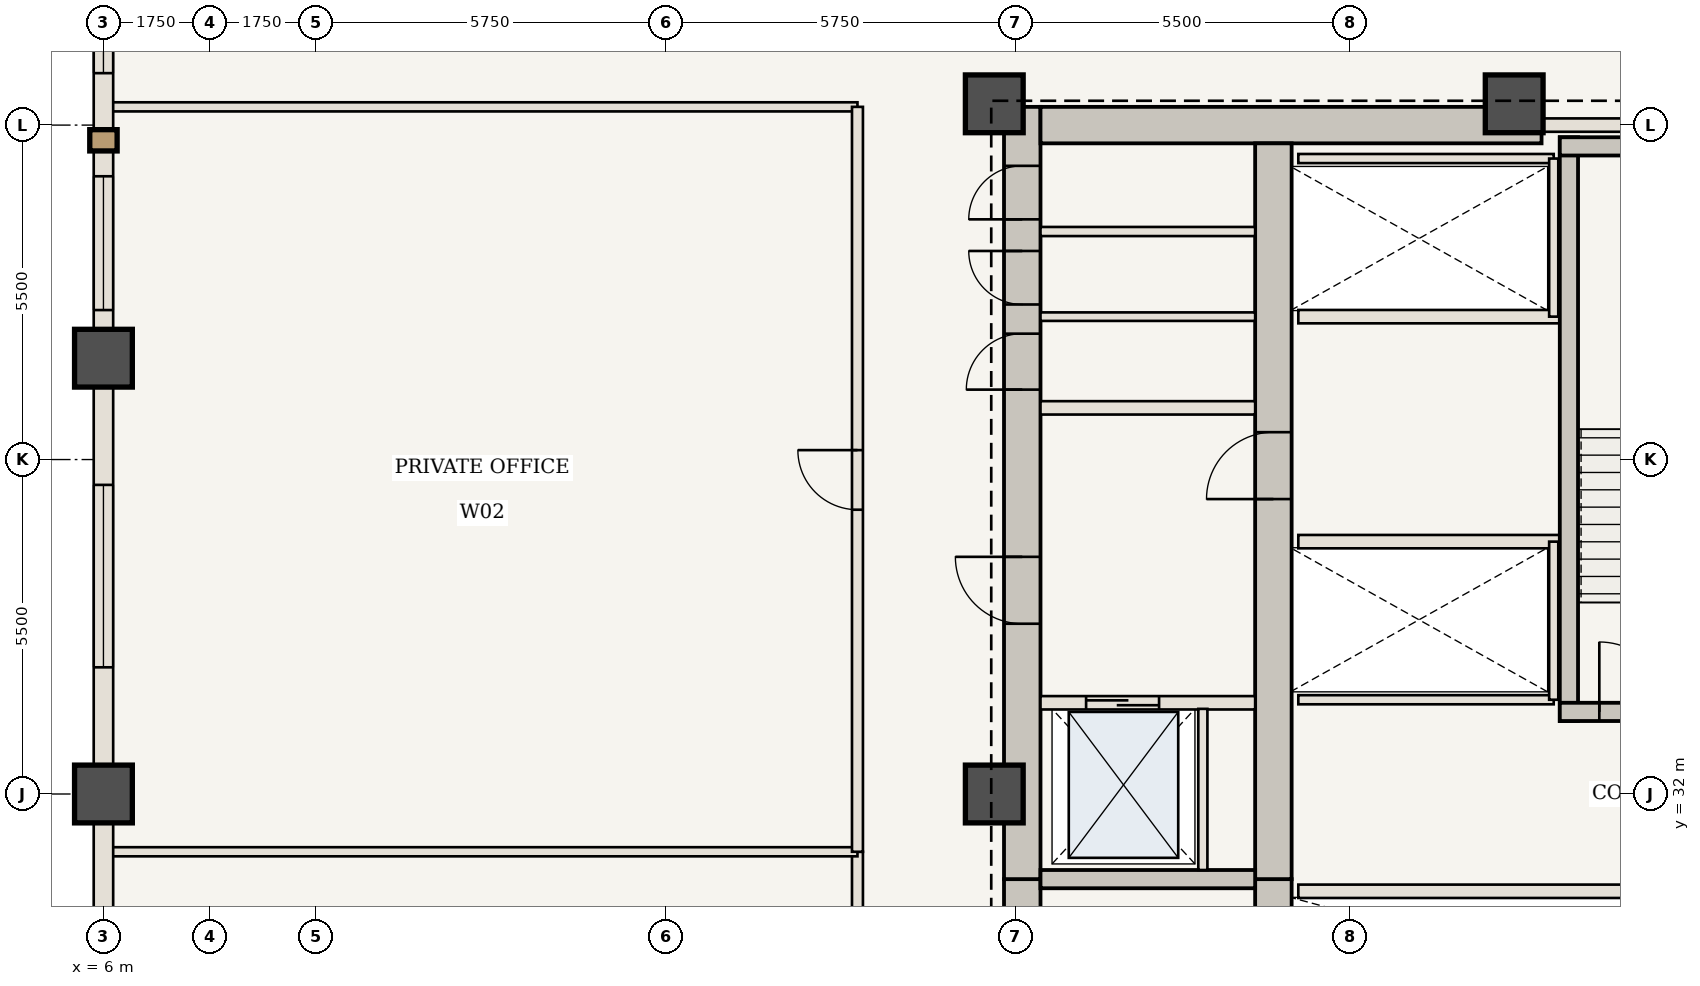
"""IFC4 building model, lengths in metres.
Left out: names, types, materials, properties, quantities, classifications, styles, units other than length and angle.
Written with IfcOpenShell. Run it as: python <this file> out.ifc"""

import sys

from ifc_helpers import new_model, si_unit, direction, frame, frame_2d, origin, origin_2d, place, context, subcontext, project, spatial, rectangle, extrude, element, fill, save


model = new_model("IFC4")
c1 = context("Model", 3, precision=1e-05, world=origin(), true_north=direction((0.0, 1.0)))
c2 = subcontext(c1, "Body", "Model", "MODEL_VIEW")
j1 = project(units=[si_unit("LENGTHUNIT", "METRE"), si_unit("PLANEANGLEUNIT", "RADIAN")], contexts=[c1])
p1 = place(None, origin())
s1 = spatial("IfcSite", under=j1, at=p1, CompositionType="ELEMENT")
p2 = place(p1, origin())
s2 = spatial("IfcBuilding", under=s1, at=p2, CompositionType="ELEMENT")
p3 = place(p2, frame((0.0, 0.0, 118.3)))
s3 = spatial("IfcBuildingStorey", under=s2, at=p3, CompositionType="ELEMENT", Elevation=118.3)
p4 = place(p3, frame((21.11, 20.65, 0.0), z_axis=(0.0, 0.0, 1.0), x_axis=(0.0, 1.0, 0.0)))
e1 = element("IfcWall", 1, at=p4, inside=s3, PredefinedType="SHEAR", context=c2, shape_type="SweptSolid", body=[
    extrude(rectangle(XDim=9.95, YDim=0.6, at=frame_2d((4.975, 0.0))), origin(), (0.0, 0.0, 1.0), 3.85),
])
p5 = place(p4, frame((1.1, 0.0, 0.0)))
e2 = element("IfcOpeningElement", 2, at=p5, cuts=e1, PredefinedType="OPENING", context=c2, shape_type="SweptSolid", body=[
    extrude(rectangle(XDim=1.15, YDim=2.15, at=frame_2d((0.575, 1.075))), frame((0.0, 0.31, 0.0), z_axis=(0.0, -1.0, 0.0), x_axis=(1.0, 0.0, 0.0)), (0.0, 0.0, 1.0), 0.62),
])
p6 = place(p3, frame((21.11, 30.6, 0.0), z_axis=(0.0, 0.0, 1.0), x_axis=(0.0, 1.0, 0.0)))
e3 = element("IfcWall", 3, at=p6, inside=s3, PredefinedType="SHEAR", context=c2, shape_type="SweptSolid", body=[
    extrude(rectangle(XDim=12.7, YDim=0.6, at=frame_2d((6.35, 0.0))), origin(), (0.0, 0.0, 1.0), 3.85),
])
p7 = place(p6, frame((4.2, 0.0, 0.0)))
e4 = element("IfcOpeningElement", 4, at=p7, cuts=e3, PredefinedType="OPENING", context=c2, shape_type="SweptSolid", body=[
    extrude(rectangle(XDim=1.1, YDim=2.15, at=frame_2d((0.55, 1.075))), frame((0.0, 0.31, 0.0), z_axis=(0.0, -1.0, 0.0), x_axis=(1.0, 0.0, 0.0)), (0.0, 0.0, 1.0), 0.62),
])
p8 = place(p6, frame((8.05, 0.0, 0.0)))
e5 = element("IfcOpeningElement", 5, at=p8, cuts=e3, PredefinedType="OPENING", context=c2, shape_type="SweptSolid", body=[
    extrude(rectangle(XDim=0.92, YDim=2.1, at=frame_2d((0.46, 1.05))), frame((0.0, 0.31, 0.0), z_axis=(0.0, -1.0, 0.0), x_axis=(1.0, 0.0, 0.0)), (0.0, 0.0, 1.0), 0.62),
])
p9 = place(p6, frame((9.45, 0.0, 0.0)))
e6 = element("IfcOpeningElement", 6, at=p9, cuts=e3, PredefinedType="OPENING", context=c2, shape_type="SweptSolid", body=[
    extrude(rectangle(XDim=0.88, YDim=2.1, at=frame_2d((0.44, 1.05))), frame((0.0, 0.31, 0.0), z_axis=(0.0, -1.0, 0.0), x_axis=(1.0, 0.0, 0.0)), (0.0, 0.0, 1.0), 0.62),
])
p10 = place(p6, frame((10.85, 0.0, 0.0)))
e7 = element("IfcOpeningElement", 7, at=p10, cuts=e3, PredefinedType="OPENING", context=c2, shape_type="SweptSolid", body=[
    extrude(rectangle(XDim=0.88, YDim=2.1, at=frame_2d((0.44, 1.05))), frame((0.0, 0.31, 0.0), z_axis=(0.0, -1.0, 0.0), x_axis=(1.0, 0.0, 0.0)), (0.0, 0.0, 1.0), 0.62),
])
p11 = place(p3, frame((21.41, 43.0, 0.0), z_axis=(0.0, 0.0, 1.0), x_axis=(1.0, 0.0, 0.0)))
e8 = element("IfcWall", 8, at=p11, inside=s3, PredefinedType="SHEAR", context=c2, shape_type="SweptSolid", body=[
    extrude(rectangle(XDim=8.24, YDim=0.6, at=frame_2d((4.12, 0.0))), origin(), (0.0, 0.0, 1.0), 3.85),
])
p12 = place(p3, frame((25.24, 21.25, 0.0), z_axis=(0.0, 0.0, 1.0), x_axis=(0.0, 1.0, 0.0)))
e9 = element("IfcWall", 9, at=p12, inside=s3, PredefinedType="SHEAR", context=c2, shape_type="SweptSolid", body=[
    extrude(rectangle(XDim=9.35, YDim=0.6, at=frame_2d((4.675, 0.0))), origin(), (0.0, 0.0, 1.0), 3.85),
])
p13 = place(p3, frame((25.24, 30.6, 0.0), z_axis=(0.0, 0.0, 1.0), x_axis=(0.0, 1.0, 0.0)))
e10 = element("IfcWall", 10, at=p13, inside=s3, PredefinedType="SHEAR", context=c2, shape_type="SweptSolid", body=[
    extrude(rectangle(XDim=12.1, YDim=0.6, at=frame_2d((6.05, 0.0))), origin(), (0.0, 0.0, 1.0), 3.85),
])
p14 = place(p13, frame((6.25, 0.0, 0.0)))
e11 = element("IfcOpeningElement", 11, at=p14, cuts=e10, PredefinedType="OPENING", context=c2, shape_type="SweptSolid", body=[
    extrude(rectangle(XDim=1.1, YDim=2.15, at=frame_2d((0.55, 1.075))), frame((0.0, 0.31, 0.0), z_axis=(0.0, -1.0, 0.0), x_axis=(1.0, 0.0, 0.0)), (0.0, 0.0, 1.0), 0.62),
])
for number, where, z_axis, x_axis in (
    (12, (29.2, 43.35, 0.0), (0.0, 0.0, 1.0), (1.0, 0.0, 0.0)),
    (13, (20.65, 43.35, 0.0), (0.0, 0.0, 1.0), (1.0, 0.0, 0.0)),
    (14, (20.65, 32.0, 0.0), (0.0, 0.0, 1.0), (1.0, 0.0, 0.0)),
    (15, (6.0, 32.0, 0.0), (0.0, 0.0, 1.0), (1.0, 0.0, 0.0)),
    (16, (6.0, 39.167, 0.0), (0.0, 0.0, 1.0), (1.0, 0.0, 0.0)),
):
    element("IfcColumn", number, at=place(p3, frame(where, z_axis=z_axis, x_axis=x_axis)), inside=s3, PredefinedType="COLUMN", context=c2, shape_type="SweptSolid", body=[
        extrude(rectangle(XDim=0.95, YDim=0.95, at=origin_2d()), origin(), (0.0, 0.0, 1.0), 3.85),
    ])
p15 = place(p3, frame((21.41, 30.6, 0.0), z_axis=(0.0, 0.0, 1.0), x_axis=(1.0, 0.0, 0.0)))
e17 = element("IfcWall", 17, at=p15, inside=s3, PredefinedType="SHEAR", context=c2, shape_type="SweptSolid", body=[
    extrude(rectangle(XDim=3.53, YDim=0.3, at=frame_2d((1.765, 0.0))), origin(), (0.0, 0.0, 1.0), 3.685),
])
p16 = place(p3, frame((21.41, 33.5, 0.0), z_axis=(0.0, 0.0, 1.0), x_axis=(1.0, 0.0, 0.0)))
e18 = element("IfcWall", 18, at=p16, inside=s3, PredefinedType="STANDARD", context=c2, shape_type="SweptSolid", body=[
    extrude(rectangle(XDim=3.53, YDim=0.22, at=frame_2d((1.765, 0.0))), origin(), (0.0, 0.0, 1.0), 3.685),
])
p17 = place(p16, frame((0.75, 0.0, 0.0)))
e19 = element("IfcOpeningElement", 19, at=p17, cuts=e18, PredefinedType="OPENING", context=c2, shape_type="SweptSolid", body=[
    extrude(rectangle(XDim=1.2, YDim=2.2, at=frame_2d((0.6, 1.1))), frame((0.0, 0.12, 0.0), z_axis=(0.0, -1.0, 0.0), x_axis=(1.0, 0.0, 0.0)), (0.0, 0.0, 1.0), 0.24),
])
p18 = place(p3, frame((24.08, 30.75, 0.0), z_axis=(0.0, 0.0, 1.0), x_axis=(0.0, 1.0, 0.0)))
e20 = element("IfcWall", 20, at=p18, inside=s3, PredefinedType="STANDARD", context=c2, shape_type="SweptSolid", body=[
    extrude(rectangle(XDim=2.65, YDim=0.15, at=frame_2d((1.325, 0.0))), origin(), (0.0, 0.0, 1.0), 3.685),
])
p19 = place(p3, frame((21.41, 38.35, 0.0), z_axis=(0.0, 0.0, 1.0), x_axis=(1.0, 0.0, 0.0)))
e21 = element("IfcWall", 21, at=p19, inside=s3, PredefinedType="STANDARD", context=c2, shape_type="SweptSolid", body=[
    extrude(rectangle(XDim=3.53, YDim=0.22, at=frame_2d((1.765, 0.0))), origin(), (0.0, 0.0, 1.0), 3.685),
])
p20 = place(p3, frame((21.41, 39.85, 0.0), z_axis=(0.0, 0.0, 1.0), x_axis=(1.0, 0.0, 0.0)))
e22 = element("IfcWall", 22, at=p20, inside=s3, PredefinedType="STANDARD", context=c2, shape_type="SweptSolid", body=[
    extrude(rectangle(XDim=3.53, YDim=0.14, at=frame_2d((1.765, 0.0))), origin(), (0.0, 0.0, 1.0), 3.685),
])
p21 = place(p3, frame((21.41, 41.25, 0.0), z_axis=(0.0, 0.0, 1.0), x_axis=(1.0, 0.0, 0.0)))
e23 = element("IfcWall", 23, at=p21, inside=s3, PredefinedType="STANDARD", context=c2, shape_type="SweptSolid", body=[
    extrude(rectangle(XDim=3.53, YDim=0.15, at=frame_2d((1.765, 0.0))), origin(), (0.0, 0.0, 1.0), 3.685),
])
p22 = place(p3, frame((25.65, 30.4, 0.0), z_axis=(0.0, 0.0, 1.0), x_axis=(1.0, 0.0, 0.0)))
e24 = element("IfcWall", 24, at=p22, inside=s3, PredefinedType="STANDARD", context=c2, shape_type="SweptSolid", body=[
    extrude(rectangle(XDim=9.25, YDim=0.22, at=frame_2d((4.625, 0.0))), origin(), (0.0, 0.0, 1.0), 3.685),
])
p23 = place(p3, frame((25.65, 36.15, 0.0), z_axis=(0.0, 0.0, 1.0), x_axis=(1.0, 0.0, 0.0)))
e25 = element("IfcWall", 25, at=p23, inside=s3, PredefinedType="STANDARD", context=c2, shape_type="SweptSolid", body=[
    extrude(rectangle(XDim=4.3, YDim=0.22, at=frame_2d((2.15, 0.0))), origin(), (0.0, 0.0, 1.0), 3.685),
])
p24 = place(p3, frame((25.65, 33.55, 0.0), z_axis=(0.0, 0.0, 1.0), x_axis=(1.0, 0.0, 0.0)))
e26 = element("IfcWall", 26, at=p24, inside=s3, PredefinedType="STANDARD", context=c2, shape_type="SweptSolid", body=[
    extrude(rectangle(XDim=4.2, YDim=0.15, at=frame_2d((2.1, 0.0))), origin(), (0.0, 0.0, 1.0), 3.685),
])
p25 = place(p3, frame((29.85, 33.55, 0.0), z_axis=(0.0, 0.0, 1.0), x_axis=(0.0, 1.0, 0.0)))
e27 = element("IfcWall", 27, at=p25, inside=s3, PredefinedType="STANDARD", context=c2, shape_type="SweptSolid", body=[
    extrude(rectangle(XDim=2.6, YDim=0.15, at=frame_2d((1.3, 0.0))), origin(), (0.0, 0.0, 1.0), 3.685),
])
p26 = place(p3, frame((25.65, 39.85, 0.0), z_axis=(0.0, 0.0, 1.0), x_axis=(1.0, 0.0, 0.0)))
e28 = element("IfcWall", 28, at=p26, inside=s3, PredefinedType="STANDARD", context=c2, shape_type="SweptSolid", body=[
    extrude(rectangle(XDim=4.3, YDim=0.22, at=frame_2d((2.15, 0.0))), origin(), (0.0, 0.0, 1.0), 3.685),
])
p27 = place(p3, frame((25.65, 42.45, 0.0), z_axis=(0.0, 0.0, 1.0), x_axis=(1.0, 0.0, 0.0)))
e29 = element("IfcWall", 29, at=p27, inside=s3, PredefinedType="STANDARD", context=c2, shape_type="SweptSolid", body=[
    extrude(rectangle(XDim=4.2, YDim=0.15, at=frame_2d((2.1, 0.0))), origin(), (0.0, 0.0, 1.0), 3.685),
])
p28 = place(p3, frame((29.85, 39.85, 0.0), z_axis=(0.0, 0.0, 1.0), x_axis=(0.0, 1.0, 0.0)))
e30 = element("IfcWall", 30, at=p28, inside=s3, PredefinedType="STANDARD", context=c2, shape_type="SweptSolid", body=[
    extrude(rectangle(XDim=2.6, YDim=0.15, at=frame_2d((1.3, 0.0))), origin(), (0.0, 0.0, 1.0), 3.685),
])
p29 = place(p3, frame((30.1, 33.2, 0.0), z_axis=(0.0, 0.0, 1.0), x_axis=(0.0, 1.0, 0.0)))
e31 = element("IfcWall", 31, at=p29, inside=s3, PredefinedType="SHEAR", context=c2, shape_type="SweptSolid", body=[
    extrude(rectangle(XDim=9.6, YDim=0.3, at=frame_2d((4.8, 0.0))), origin(), (0.0, 0.0, 1.0), 3.685),
])
p30 = place(p3, frame((29.95, 33.35, 0.0), z_axis=(0.0, 0.0, 1.0), x_axis=(1.0, 0.0, 0.0)))
e32 = element("IfcWall", 32, at=p30, inside=s3, PredefinedType="SHEAR", context=c2, shape_type="SweptSolid", body=[
    extrude(rectangle(XDim=4.05, YDim=0.3, at=frame_2d((2.025, 0.0))), origin(), (0.0, 0.0, 1.0), 3.685),
])
p31 = place(p30, frame((0.65, 0.0, 0.0)))
e33 = element("IfcOpeningElement", 33, at=p31, cuts=e32, PredefinedType="OPENING", context=c2, shape_type="SweptSolid", body=[
    extrude(rectangle(XDim=1.15, YDim=2.15, at=frame_2d((0.575, 1.075))), frame((0.0, 0.16, 0.0), z_axis=(0.0, -1.0, 0.0), x_axis=(1.0, 0.0, 0.0)), (0.0, 0.0, 1.0), 0.32),
])
p32 = place(p3, frame((29.95, 42.65, 0.0), z_axis=(0.0, 0.0, 1.0), x_axis=(1.0, 0.0, 0.0)))
e34 = element("IfcWall", 34, at=p32, inside=s3, PredefinedType="SHEAR", context=c2, shape_type="SweptSolid", body=[
    extrude(rectangle(XDim=4.05, YDim=0.3, at=frame_2d((2.025, 0.0))), origin(), (0.0, 0.0, 1.0), 3.685),
])
p33 = place(p3, frame((29.65, 43.0, 0.0), z_axis=(0.0, 0.0, 1.0), x_axis=(1.0, 0.0, 0.0)))
e35 = element("IfcWall", 35, at=p33, inside=s3, PredefinedType="STANDARD", context=c2, shape_type="SweptSolid", body=[
    extrude(rectangle(XDim=8.1, YDim=0.22, at=frame_2d((4.05, 0.0))), origin(), (0.0, 0.0, 1.0), 3.685),
])
p34 = place(p33, frame((5.95, 0.0, 0.0)))
e36 = element("IfcOpeningElement", 36, at=p34, cuts=e35, PredefinedType="OPENING", context=c2, shape_type="SweptSolid", body=[
    extrude(rectangle(XDim=1.1, YDim=2.15, at=frame_2d((0.55, 1.075))), frame((0.0, 0.12, 0.0), z_axis=(0.0, -1.0, 0.0), x_axis=(1.0, 0.0, 0.0)), (0.0, 0.0, 1.0), 0.24),
])
p35 = place(p3, frame((6.06, 43.3, 0.0), z_axis=(0.0, 0.0, 1.0), x_axis=(1.0, 0.0, 0.0)))
e37 = element("IfcWall", 37, at=p35, inside=s3, PredefinedType="STANDARD", context=c2, shape_type="SweptSolid", body=[
    extrude(rectangle(XDim=12.34, YDim=0.15, at=frame_2d((6.17, 0.0))), origin(), (0.0, 0.0, 1.0), 3.065),
])
p36 = place(p3, frame((18.4, 20.7, 0.0), z_axis=(0.0, 0.0, 1.0), x_axis=(0.0, 1.0, 0.0)))
e38 = element("IfcWall", 38, at=p36, inside=s3, PredefinedType="STANDARD", context=c2, shape_type="SweptSolid", body=[
    extrude(rectangle(XDim=10.35, YDim=0.18, at=frame_2d((5.175, 0.0))), origin(), (0.0, 0.0, 1.0), 3.685),
])
p37 = place(p36, frame((4.675, 0.0, 0.0)))
e39 = element("IfcOpeningElement", 39, at=p37, cuts=e38, PredefinedType="OPENING", context=c2, shape_type="SweptSolid", body=[
    extrude(rectangle(XDim=0.98, YDim=2.2, at=frame_2d((0.49, 1.1))), frame((0.0, 0.1, 0.0), z_axis=(0.0, -1.0, 0.0), x_axis=(1.0, 0.0, 0.0)), (0.0, 0.0, 1.0), 0.2),
])
p38 = place(p3, frame((6.06, 31.05, 0.0), z_axis=(0.0, 0.0, 1.0), x_axis=(1.0, 0.0, 0.0)))
e40 = element("IfcWall", 40, at=p38, inside=s3, PredefinedType="STANDARD", context=c2, shape_type="SweptSolid", body=[
    extrude(rectangle(XDim=12.34, YDim=0.15, at=frame_2d((6.17, 0.0))), origin(), (0.0, 0.0, 1.0), 3.685),
])
p39 = place(p3, frame((18.4, 31.05, 0.0), z_axis=(0.0, 0.0, 1.0), x_axis=(0.0, 1.0, 0.0)))
e41 = element("IfcWall", 41, at=p39, inside=s3, PredefinedType="STANDARD", context=c2, shape_type="SweptSolid", body=[
    extrude(rectangle(XDim=12.25, YDim=0.18, at=frame_2d((6.125, 0.0))), origin(), (0.0, 0.0, 1.0), 3.685),
])
p40 = place(p39, frame((5.625, 0.0, 0.0)))
e42 = element("IfcOpeningElement", 42, at=p40, cuts=e41, PredefinedType="OPENING", context=c2, shape_type="SweptSolid", body=[
    extrude(rectangle(XDim=0.98, YDim=2.2, at=frame_2d((0.49, 1.1))), frame((0.0, 0.1, 0.0), z_axis=(0.0, -1.0, 0.0), x_axis=(1.0, 0.0, 0.0)), (0.0, 0.0, 1.0), 0.2),
])
p41 = place(p3, frame((6.0, 24.833, 0.0), z_axis=(0.0, 0.0, 1.0), x_axis=(0.0, 1.0, 0.0)))
e43 = element("IfcWall", 43, at=p41, inside=s3, PredefinedType="USERDEFINED", context=c2, shape_type="SweptSolid", body=[
    extrude(rectangle(XDim=7.167, YDim=0.32, at=frame_2d((3.583, 0.0))), origin(), (0.0, 0.0, 1.0), 2.885),
])
p42 = place(p41, frame((1.771, 0.0, 0.85)))
e44 = element("IfcOpeningElement", 44, at=p42, cuts=e43, PredefinedType="OPENING", context=c2, shape_type="SweptSolid", body=[
    extrude(rectangle(XDim=3.0, YDim=1.835, at=frame_2d((1.5, 0.917))), frame((0.0, 0.17, 0.0), z_axis=(0.0, -1.0, 0.0), x_axis=(1.0, 0.0, 0.0)), (0.0, 0.0, 1.0), 0.34),
])
p43 = place(p3, frame((6.0, 32.0, 0.0), z_axis=(0.0, 0.0, 1.0), x_axis=(0.0, 1.0, 0.0)))
e45 = element("IfcWall", 45, at=p43, inside=s3, PredefinedType="USERDEFINED", context=c2, shape_type="SweptSolid", body=[
    extrude(rectangle(XDim=7.167, YDim=0.32, at=frame_2d((3.583, 0.0))), origin(), (0.0, 0.0, 1.0), 2.885),
])
p44 = place(p43, frame((2.083, 0.0, 0.85)))
e46 = element("IfcOpeningElement", 46, at=p44, cuts=e45, PredefinedType="OPENING", context=c2, shape_type="SweptSolid", body=[
    extrude(rectangle(XDim=3.0, YDim=1.835, at=frame_2d((1.5, 0.917))), frame((0.0, 0.17, 0.0), z_axis=(0.0, -1.0, 0.0), x_axis=(1.0, 0.0, 0.0)), (0.0, 0.0, 1.0), 0.34),
])
p45 = place(p3, frame((6.0, 39.167, 0.0), z_axis=(0.0, 0.0, 1.0), x_axis=(0.0, 1.0, 0.0)))
e47 = element("IfcWall", 47, at=p45, inside=s3, PredefinedType="USERDEFINED", context=c2, shape_type="SweptSolid", body=[
    extrude(rectangle(XDim=7.167, YDim=0.32, at=frame_2d((3.583, 0.0))), origin(), (0.0, 0.0, 1.0), 2.885),
])
p46 = place(p45, frame((0.792, 0.0, 0.85)))
e48 = element("IfcOpeningElement", 48, at=p46, cuts=e47, PredefinedType="OPENING", context=c2, shape_type="SweptSolid", body=[
    extrude(rectangle(XDim=2.2, YDim=1.835, at=frame_2d((1.1, 0.917))), frame((0.0, 0.17, 0.0), z_axis=(0.0, -1.0, 0.0), x_axis=(1.0, 0.0, 0.0)), (0.0, 0.0, 1.0), 0.34),
])
p47 = place(p45, frame((4.688, 0.0, 0.85)))
e49 = element("IfcOpeningElement", 49, at=p47, cuts=e47, PredefinedType="OPENING", context=c2, shape_type="SweptSolid", body=[
    extrude(rectangle(XDim=1.6, YDim=1.835, at=frame_2d((0.8, 0.917))), frame((0.0, 0.17, 0.0), z_axis=(0.0, -1.0, 0.0), x_axis=(1.0, 0.0, 0.0)), (0.0, 0.0, 1.0), 0.34),
])
p48 = place(p7, origin())
e50 = element("IfcDoor", 50, at=p48, inside=s3, OperationType="SINGLE_SWING_RIGHT", PredefinedType="DOOR", context=c2, shape_type="SweptSolid", body=[
    extrude(rectangle(XDim=1.1, YDim=2.15, at=frame_2d((0.55, 1.075))), frame((0.0, 0.025, 0.0), z_axis=(0.0, -1.0, 0.0), x_axis=(1.0, 0.0, 0.0)), (0.0, 0.0, 1.0), 0.05),
])
fill(e4, e50)
p49 = place(p14, origin())
e51 = element("IfcDoor", 51, at=p49, inside=s3, OperationType="SINGLE_SWING_LEFT", PredefinedType="DOOR", context=c2, shape_type="SweptSolid", body=[
    extrude(rectangle(XDim=1.1, YDim=2.15, at=frame_2d((0.55, 1.075))), frame((0.0, 0.025, 0.0), z_axis=(0.0, -1.0, 0.0), x_axis=(1.0, 0.0, 0.0)), (0.0, 0.0, 1.0), 0.05),
])
fill(e11, e51)
p50 = place(p8, origin())
e52 = element("IfcDoor", 52, at=p50, inside=s3, OperationType="SINGLE_SWING_LEFT", PredefinedType="DOOR", context=c2, shape_type="SweptSolid", body=[
    extrude(rectangle(XDim=0.92, YDim=2.1, at=frame_2d((0.46, 1.05))), frame((0.0, 0.025, 0.0), z_axis=(0.0, -1.0, 0.0), x_axis=(1.0, 0.0, 0.0)), (0.0, 0.0, 1.0), 0.05),
])
fill(e5, e52)
p51 = place(p9, origin())
e53 = element("IfcDoor", 53, at=p51, inside=s3, OperationType="SINGLE_SWING_RIGHT", PredefinedType="DOOR", context=c2, shape_type="SweptSolid", body=[
    extrude(rectangle(XDim=0.88, YDim=2.1, at=frame_2d((0.44, 1.05))), frame((0.0, 0.025, 0.0), z_axis=(0.0, -1.0, 0.0), x_axis=(1.0, 0.0, 0.0)), (0.0, 0.0, 1.0), 0.05),
])
fill(e6, e53)
p52 = place(p10, origin())
e54 = element("IfcDoor", 54, at=p52, inside=s3, OperationType="SINGLE_SWING_LEFT", PredefinedType="DOOR", context=c2, shape_type="SweptSolid", body=[
    extrude(rectangle(XDim=0.88, YDim=2.1, at=frame_2d((0.44, 1.05))), frame((0.0, 0.025, 0.0), z_axis=(0.0, -1.0, 0.0), x_axis=(1.0, 0.0, 0.0)), (0.0, 0.0, 1.0), 0.05),
])
fill(e7, e54)
p53 = place(p17, origin())
e55 = element("IfcDoor", 55, at=p53, inside=s3, OperationType="DOUBLE_DOOR_SLIDING", PredefinedType="DOOR", context=c2, shape_type="SweptSolid", body=[
    extrude(rectangle(XDim=1.2, YDim=2.2, at=frame_2d((0.6, 1.1))), frame((0.0, 0.025, 0.0), z_axis=(0.0, -1.0, 0.0), x_axis=(1.0, 0.0, 0.0)), (0.0, 0.0, 1.0), 0.05),
])
fill(e19, e55)
p54 = place(p31, origin())
e56 = element("IfcDoor", 56, at=p54, inside=s3, OperationType="SINGLE_SWING_LEFT", PredefinedType="DOOR", context=c2, shape_type="SweptSolid", body=[
    extrude(rectangle(XDim=1.15, YDim=2.15, at=frame_2d((0.575, 1.075))), frame((0.0, 0.025, 0.0), z_axis=(0.0, -1.0, 0.0), x_axis=(1.0, 0.0, 0.0)), (0.0, 0.0, 1.0), 0.05),
])
fill(e33, e56)
p55 = place(p40, origin())
e57 = element("IfcDoor", 57, at=p55, inside=s3, OperationType="SINGLE_SWING_RIGHT", PredefinedType="DOOR", context=c2, shape_type="SweptSolid", body=[
    extrude(rectangle(XDim=0.98, YDim=2.2, at=frame_2d((0.49, 1.1))), frame((0.0, 0.025, 0.0), z_axis=(0.0, -1.0, 0.0), x_axis=(1.0, 0.0, 0.0)), (0.0, 0.0, 1.0), 0.05),
])
fill(e42, e57)
p56 = place(p44, origin())
e58 = element("IfcWindow", 58, at=p56, inside=s3, PartitioningType="SINGLE_PANEL", PredefinedType="WINDOW", context=c2, shape_type="SweptSolid", body=[
    extrude(rectangle(XDim=3.0, YDim=1.835, at=frame_2d((1.5, 0.917))), frame((0.0, 0.03, 0.0), z_axis=(0.0, -1.0, 0.0), x_axis=(1.0, 0.0, 0.0)), (0.0, 0.0, 1.0), 0.06),
])
fill(e46, e58)
p57 = place(p46, origin())
e59 = element("IfcWindow", 59, at=p57, inside=s3, PartitioningType="SINGLE_PANEL", PredefinedType="WINDOW", context=c2, shape_type="SweptSolid", body=[
    extrude(rectangle(XDim=2.2, YDim=1.835, at=frame_2d((1.1, 0.917))), frame((0.0, 0.03, 0.0), z_axis=(0.0, -1.0, 0.0), x_axis=(1.0, 0.0, 0.0)), (0.0, 0.0, 1.0), 0.06),
])
fill(e48, e59)
p58 = place(p47, origin())
e60 = element("IfcWindow", 60, at=p58, inside=s3, PartitioningType="SINGLE_PANEL", PredefinedType="WINDOW", context=c2, shape_type="SweptSolid", body=[
    extrude(rectangle(XDim=1.6, YDim=1.835, at=frame_2d((0.8, 0.917))), frame((0.0, 0.03, 0.0), z_axis=(0.0, -1.0, 0.0), x_axis=(1.0, 0.0, 0.0)), (0.0, 0.0, 1.0), 0.06),
])
fill(e49, e60)
save(model, sys.argv[1])
